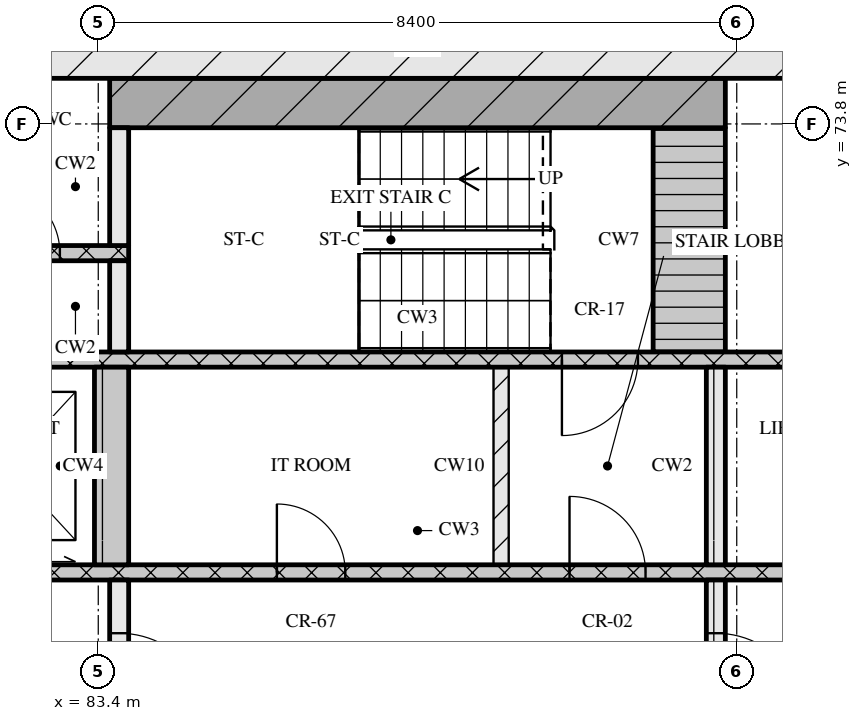
"""IFC4 building model, lengths in metres.
Left out: names, types, materials, properties, quantities, classifications, styles, units other than length and angle.
Written with IfcOpenShell. Run it as: python <this file> out.ifc"""

import sys

from ifc_helpers import new_model, si_unit, direction, frame, frame_2d, origin, place, context, subcontext, project, spatial, rectangle, extrude, element, fill, save


model = new_model("IFC4")
c1 = context("Model", 3, precision=1e-05, world=origin(), true_north=direction((0.0, 1.0)))
c2 = subcontext(c1, "Body", "Model", "MODEL_VIEW")
j1 = project(units=[si_unit("LENGTHUNIT", "METRE"), si_unit("PLANEANGLEUNIT", "RADIAN")], contexts=[c1])
p1 = place(None, origin())
s1 = spatial("IfcSite", under=j1, at=p1, CompositionType="ELEMENT")
p2 = place(p1, origin())
s2 = spatial("IfcBuilding", under=s1, at=p2, CompositionType="ELEMENT")
p3 = place(p2, frame((0.0, 0.0, 80.4)))
s3 = spatial("IfcBuildingStorey", under=s2, at=p3, CompositionType="ELEMENT", Elevation=80.4)
p4 = place(p3, frame((66.6, 75.0, 0.0), z_axis=(0.0, 0.0, 1.0), x_axis=(1.0, 0.0, 0.0)))
e1 = element("IfcWall", 1, at=p4, inside=s3, PredefinedType="SOLIDWALL", context=c2, shape_type="SweptSolid", body=[
    extrude(rectangle(XDim=42.0, YDim=1.2, at=frame_2d((21.0, 0.0))), origin(), (0.0, 0.0, 1.0), 3.3),
])
p5 = place(p3, frame((83.675, 65.2, 0.0), z_axis=(0.0, 0.0, 1.0), x_axis=(0.0, 1.0, 0.0)))
e2 = element("IfcWall", 2, at=p5, inside=s3, PredefinedType="SOLIDWALL", context=c2, shape_type="SweptSolid", body=[
    extrude(rectangle(XDim=2.6, YDim=0.25, at=frame_2d((1.3, 0.0))), origin(), (0.0, 0.0, 1.0), 3.3),
])
p6 = place(p5, frame((0.7, 0.0, 0.0)))
e3 = element("IfcOpeningElement", 3, at=p6, cuts=e2, PredefinedType="OPENING", context=c2, shape_type="SweptSolid", body=[
    extrude(rectangle(XDim=1.2, YDim=2.1, at=frame_2d((0.6, 1.05))), frame((0.0, 0.135, 0.0), z_axis=(0.0, -1.0, 0.0), x_axis=(1.0, 0.0, 0.0)), (0.0, 0.0, 1.0), 0.27),
])
p7 = place(p3, frame((91.525, 65.2, 0.0), z_axis=(0.0, 0.0, 1.0), x_axis=(0.0, 1.0, 0.0)))
e4 = element("IfcWall", 4, at=p7, inside=s3, PredefinedType="SOLIDWALL", context=c2, shape_type="SweptSolid", body=[
    extrude(rectangle(XDim=2.6, YDim=0.25, at=frame_2d((1.3, 0.0))), origin(), (0.0, 0.0, 1.0), 3.3),
])
p8 = place(p7, frame((0.7, 0.0, 0.0)))
e5 = element("IfcOpeningElement", 5, at=p8, cuts=e4, PredefinedType="OPENING", context=c2, shape_type="SweptSolid", body=[
    extrude(rectangle(XDim=1.2, YDim=2.1, at=frame_2d((0.6, 1.05))), frame((0.0, 0.135, 0.0), z_axis=(0.0, -1.0, 0.0), x_axis=(1.0, 0.0, 0.0)), (0.0, 0.0, 1.0), 0.27),
])
p9 = place(p3, frame((76.05, 67.9, 0.0), z_axis=(0.0, 0.0, 1.0), x_axis=(1.0, 0.0, 0.0)))
e6 = element("IfcWall", 6, at=p9, inside=s3, PredefinedType="SOLIDWALL", context=c2, shape_type="SweptSolid", body=[
    extrude(rectangle(XDim=23.1, YDim=0.2, at=frame_2d((11.55, 0.0))), origin(), (0.0, 0.0, 1.0), 3.3),
])
p10 = place(p9, frame((0.6, 0.0, 0.0)))
e7 = element("IfcOpeningElement", 7, at=p10, cuts=e6, PredefinedType="OPENING", context=c2, shape_type="SweptSolid", body=[
    extrude(rectangle(XDim=1.1, YDim=2.1, at=frame_2d((0.55, 1.05))), frame((0.0, 0.11, 0.0), z_axis=(0.0, -1.0, 0.0), x_axis=(1.0, 0.0, 0.0)), (0.0, 0.0, 1.0), 0.22),
])
p11 = place(p9, frame((3.1, 0.0, 0.0)))
e8 = element("IfcOpeningElement", 8, at=p11, cuts=e6, PredefinedType="OPENING", context=c2, shape_type="SweptSolid", body=[
    extrude(rectangle(XDim=1.1, YDim=2.1, at=frame_2d((0.55, 1.05))), frame((0.0, 0.11, 0.0), z_axis=(0.0, -1.0, 0.0), x_axis=(1.0, 0.0, 0.0)), (0.0, 0.0, 1.0), 0.22),
])
p12 = place(p9, frame((5.6, 0.0, 0.0)))
e9 = element("IfcOpeningElement", 9, at=p12, cuts=e6, PredefinedType="OPENING", context=c2, shape_type="SweptSolid", body=[
    extrude(rectangle(XDim=1.1, YDim=2.1, at=frame_2d((0.55, 1.05))), frame((0.0, 0.11, 0.0), z_axis=(0.0, -1.0, 0.0), x_axis=(1.0, 0.0, 0.0)), (0.0, 0.0, 1.0), 0.22),
])
p13 = place(p9, frame((9.7, 0.0, 0.0)))
e10 = element("IfcOpeningElement", 10, at=p13, cuts=e6, PredefinedType="OPENING", context=c2, shape_type="SweptSolid", body=[
    extrude(rectangle(XDim=0.9, YDim=2.1, at=frame_2d((0.45, 1.05))), frame((0.0, 0.11, 0.0), z_axis=(0.0, -1.0, 0.0), x_axis=(1.0, 0.0, 0.0)), (0.0, 0.0, 1.0), 0.22),
])
p14 = place(p9, frame((13.55, 0.0, 0.0)))
e11 = element("IfcOpeningElement", 11, at=p14, cuts=e6, PredefinedType="OPENING", context=c2, shape_type="SweptSolid", body=[
    extrude(rectangle(XDim=1.0, YDim=2.1, at=frame_2d((0.5, 1.05))), frame((0.0, 0.11, 0.0), z_axis=(0.0, -1.0, 0.0), x_axis=(1.0, 0.0, 0.0)), (0.0, 0.0, 1.0), 0.22),
])
p15 = place(p3, frame((83.575, 68.0, 0.0), z_axis=(0.0, 0.0, 1.0), x_axis=(0.0, 1.0, 0.0)))
e12 = element("IfcWall", 12, at=p15, inside=s3, PredefinedType="SOLIDWALL", context=c2, shape_type="SweptSolid", body=[
    extrude(rectangle(XDim=2.6, YDim=0.45, at=frame_2d((1.3, 0.0))), origin(), (0.0, 0.0, 1.0), 3.3),
])
p16 = place(p3, frame((88.7, 68.0, 0.0), z_axis=(0.0, 0.0, 1.0), x_axis=(0.0, 1.0, 0.0)))
e13 = element("IfcWall", 13, at=p16, inside=s3, PredefinedType="PARTITIONING", context=c2, shape_type="SweptSolid", body=[
    extrude(rectangle(XDim=2.6, YDim=0.2, at=frame_2d((1.3, 0.0))), origin(), (0.0, 0.0, 1.0), 3.3),
])
p17 = place(p3, frame((91.525, 68.0, 0.0), z_axis=(0.0, 0.0, 1.0), x_axis=(0.0, 1.0, 0.0)))
e14 = element("IfcWall", 14, at=p17, inside=s3, PredefinedType="SOLIDWALL", context=c2, shape_type="SweptSolid", body=[
    extrude(rectangle(XDim=2.6, YDim=0.25, at=frame_2d((1.3, 0.0))), origin(), (0.0, 0.0, 1.0), 3.3),
])
p18 = place(p3, frame((67.8, 70.7, 0.0), z_axis=(0.0, 0.0, 1.0), x_axis=(1.0, 0.0, 0.0)))
e15 = element("IfcWall", 15, at=p18, inside=s3, PredefinedType="SOLIDWALL", context=c2, shape_type="SweptSolid", body=[
    extrude(rectangle(XDim=39.6, YDim=0.2, at=frame_2d((19.8, 0.0))), origin(), (0.0, 0.0, 1.0), 3.3),
])
p19 = place(p18, frame((0.65, 0.0, 0.0)))
e16 = element("IfcOpeningElement", 16, at=p19, cuts=e15, PredefinedType="OPENING", context=c2, shape_type="SweptSolid", body=[
    extrude(rectangle(XDim=1.1, YDim=2.1, at=frame_2d((0.55, 1.05))), frame((0.0, 0.11, 0.0), z_axis=(0.0, -1.0, 0.0), x_axis=(1.0, 0.0, 0.0)), (0.0, 0.0, 1.0), 0.22),
])
p20 = place(p18, frame((3.25, 0.0, 0.0)))
e17 = element("IfcOpeningElement", 17, at=p20, cuts=e15, PredefinedType="OPENING", context=c2, shape_type="SweptSolid", body=[
    extrude(rectangle(XDim=1.1, YDim=2.1, at=frame_2d((0.55, 1.05))), frame((0.0, 0.11, 0.0), z_axis=(0.0, -1.0, 0.0), x_axis=(1.0, 0.0, 0.0)), (0.0, 0.0, 1.0), 0.22),
])
p21 = place(p18, frame((5.9, 0.0, 0.0)))
e18 = element("IfcOpeningElement", 18, at=p21, cuts=e15, PredefinedType="OPENING", context=c2, shape_type="SweptSolid", body=[
    extrude(rectangle(XDim=1.0, YDim=2.1, at=frame_2d((0.5, 1.05))), frame((0.0, 0.11, 0.0), z_axis=(0.0, -1.0, 0.0), x_axis=(1.0, 0.0, 0.0)), (0.0, 0.0, 1.0), 0.22),
])
p22 = place(p18, frame((21.7, 0.0, 0.0)))
e19 = element("IfcOpeningElement", 19, at=p22, cuts=e15, PredefinedType="OPENING", context=c2, shape_type="SweptSolid", body=[
    extrude(rectangle(XDim=1.0, YDim=2.1, at=frame_2d((0.5, 1.05))), frame((0.0, 0.11, 0.0), z_axis=(0.0, -1.0, 0.0), x_axis=(1.0, 0.0, 0.0)), (0.0, 0.0, 1.0), 0.22),
])
p23 = place(p18, frame((32.7, 0.0, 0.0)))
e20 = element("IfcOpeningElement", 20, at=p23, cuts=e15, PredefinedType="OPENING", context=c2, shape_type="SweptSolid", body=[
    extrude(rectangle(XDim=1.0, YDim=2.1, at=frame_2d((0.5, 1.05))), frame((0.0, 0.11, 0.0), z_axis=(0.0, -1.0, 0.0), x_axis=(1.0, 0.0, 0.0)), (0.0, 0.0, 1.0), 0.22),
])
p24 = place(p18, frame((35.25, 0.0, 0.0)))
e21 = element("IfcOpeningElement", 21, at=p24, cuts=e15, PredefinedType="OPENING", context=c2, shape_type="SweptSolid", body=[
    extrude(rectangle(XDim=1.1, YDim=2.1, at=frame_2d((0.55, 1.05))), frame((0.0, 0.11, 0.0), z_axis=(0.0, -1.0, 0.0), x_axis=(1.0, 0.0, 0.0)), (0.0, 0.0, 1.0), 0.22),
])
p25 = place(p18, frame((37.85, 0.0, 0.0)))
e22 = element("IfcOpeningElement", 22, at=p25, cuts=e15, PredefinedType="OPENING", context=c2, shape_type="SweptSolid", body=[
    extrude(rectangle(XDim=1.1, YDim=2.1, at=frame_2d((0.55, 1.05))), frame((0.0, 0.11, 0.0), z_axis=(0.0, -1.0, 0.0), x_axis=(1.0, 0.0, 0.0)), (0.0, 0.0, 1.0), 0.22),
])
p26 = place(p3, frame((83.675, 70.8, 0.0), z_axis=(0.0, 0.0, 1.0), x_axis=(0.0, 1.0, 0.0)))
e23 = element("IfcWall", 23, at=p26, inside=s3, PredefinedType="SOLIDWALL", context=c2, shape_type="SweptSolid", body=[
    extrude(rectangle(XDim=1.2, YDim=0.25, at=frame_2d((0.6, 0.0))), origin(), (0.0, 0.0, 1.0), 3.3),
])
p27 = place(p3, frame((91.175, 70.8, 0.0), z_axis=(0.0, 0.0, 1.0), x_axis=(0.0, 1.0, 0.0)))
e24 = element("IfcWall", 24, at=p27, inside=s3, PredefinedType="SOLIDWALL", context=c2, shape_type="SweptSolid", body=[
    extrude(rectangle(XDim=2.95, YDim=0.95, at=frame_2d((1.475, 0.0))), origin(), (0.0, 0.0, 1.0), 3.3),
])
p28 = place(p3, frame((72.8, 72.1, 0.0), z_axis=(0.0, 0.0, 1.0), x_axis=(1.0, 0.0, 0.0)))
e25 = element("IfcWall", 25, at=p28, inside=s3, PredefinedType="SOLIDWALL", context=c2, shape_type="SweptSolid", body=[
    extrude(rectangle(XDim=11.0, YDim=0.2, at=frame_2d((5.5, 0.0))), origin(), (0.0, 0.0, 1.0), 3.3),
])
p29 = place(p28, frame((1.25, 0.0, 0.0)))
e26 = element("IfcOpeningElement", 26, at=p29, cuts=e25, PredefinedType="OPENING", context=c2, shape_type="SweptSolid", body=[
    extrude(rectangle(XDim=0.9, YDim=2.1, at=frame_2d((0.45, 1.05))), frame((0.0, 0.11, 0.0), z_axis=(0.0, -1.0, 0.0), x_axis=(1.0, 0.0, 0.0)), (0.0, 0.0, 1.0), 0.22),
])
p30 = place(p28, frame((3.85, 0.0, 0.0)))
e27 = element("IfcOpeningElement", 27, at=p30, cuts=e25, PredefinedType="OPENING", context=c2, shape_type="SweptSolid", body=[
    extrude(rectangle(XDim=0.9, YDim=2.1, at=frame_2d((0.45, 1.05))), frame((0.0, 0.11, 0.0), z_axis=(0.0, -1.0, 0.0), x_axis=(1.0, 0.0, 0.0)), (0.0, 0.0, 1.0), 0.22),
])
p31 = place(p28, frame((6.42, 0.0, 0.0)))
e28 = element("IfcOpeningElement", 28, at=p31, cuts=e25, PredefinedType="OPENING", context=c2, shape_type="SweptSolid", body=[
    extrude(rectangle(XDim=0.9, YDim=2.1, at=frame_2d((0.45, 1.05))), frame((0.0, 0.11, 0.0), z_axis=(0.0, -1.0, 0.0), x_axis=(1.0, 0.0, 0.0)), (0.0, 0.0, 1.0), 0.22),
])
p32 = place(p28, frame((9.195, 0.0, 0.0)))
e29 = element("IfcOpeningElement", 29, at=p32, cuts=e25, PredefinedType="OPENING", context=c2, shape_type="SweptSolid", body=[
    extrude(rectangle(XDim=0.9, YDim=2.1, at=frame_2d((0.45, 1.05))), frame((0.0, 0.11, 0.0), z_axis=(0.0, -1.0, 0.0), x_axis=(1.0, 0.0, 0.0)), (0.0, 0.0, 1.0), 0.22),
])
p33 = place(p3, frame((83.675, 72.2, 0.0), z_axis=(0.0, 0.0, 1.0), x_axis=(0.0, 1.0, 0.0)))
e30 = element("IfcWall", 30, at=p33, inside=s3, PredefinedType="SOLIDWALL", context=c2, shape_type="SweptSolid", body=[
    extrude(rectangle(XDim=1.55, YDim=0.25, at=frame_2d((0.775, 0.0))), origin(), (0.0, 0.0, 1.0), 3.3),
])
p34 = place(p3, frame((83.55, 74.075, 0.0), z_axis=(0.0, 0.0, 1.0), x_axis=(1.0, 0.0, 0.0)))
e31 = element("IfcWall", 31, at=p34, inside=s3, PredefinedType="SOLIDWALL", context=c2, shape_type="SweptSolid", body=[
    extrude(rectangle(XDim=8.1, YDim=0.65, at=frame_2d((4.05, 0.0))), origin(), (0.0, 0.0, 1.0), 3.3),
])
p35 = place(p6, origin())
e32 = element("IfcDoor", 32, at=p35, inside=s3, OperationType="SINGLE_SWING_RIGHT", PredefinedType="DOOR", context=c2, shape_type="SweptSolid", body=[
    extrude(rectangle(XDim=1.2, YDim=2.1, at=frame_2d((0.6, 1.05))), frame((0.0, 0.025, 0.0), z_axis=(0.0, -1.0, 0.0), x_axis=(1.0, 0.0, 0.0)), (0.0, 0.0, 1.0), 0.05),
])
fill(e3, e32)
p36 = place(p8, origin())
e33 = element("IfcDoor", 33, at=p36, inside=s3, OperationType="SINGLE_SWING_RIGHT", PredefinedType="DOOR", context=c2, shape_type="SweptSolid", body=[
    extrude(rectangle(XDim=1.2, YDim=2.1, at=frame_2d((0.6, 1.05))), frame((0.0, 0.025, 0.0), z_axis=(0.0, -1.0, 0.0), x_axis=(1.0, 0.0, 0.0)), (0.0, 0.0, 1.0), 0.05),
])
fill(e5, e33)
p37 = place(p13, origin())
e34 = element("IfcDoor", 34, at=p37, inside=s3, OperationType="SINGLE_SWING_LEFT", PredefinedType="DOOR", context=c2, shape_type="SweptSolid", body=[
    extrude(rectangle(XDim=0.9, YDim=2.1, at=frame_2d((0.45, 1.05))), frame((0.0, 0.025, 0.0), z_axis=(0.0, -1.0, 0.0), x_axis=(1.0, 0.0, 0.0)), (0.0, 0.0, 1.0), 0.05),
])
fill(e10, e34)
p38 = place(p14, origin())
e35 = element("IfcDoor", 35, at=p38, inside=s3, OperationType="SINGLE_SWING_LEFT", PredefinedType="DOOR", context=c2, shape_type="SweptSolid", body=[
    extrude(rectangle(XDim=1.0, YDim=2.1, at=frame_2d((0.5, 1.05))), frame((0.0, 0.025, 0.0), z_axis=(0.0, -1.0, 0.0), x_axis=(1.0, 0.0, 0.0)), (0.0, 0.0, 1.0), 0.05),
])
fill(e11, e35)
p39 = place(p22, origin())
e36 = element("IfcDoor", 36, at=p39, inside=s3, OperationType="SINGLE_SWING_RIGHT", PredefinedType="DOOR", context=c2, shape_type="SweptSolid", body=[
    extrude(rectangle(XDim=1.0, YDim=2.1, at=frame_2d((0.5, 1.05))), frame((0.0, 0.025, 0.0), z_axis=(0.0, -1.0, 0.0), x_axis=(1.0, 0.0, 0.0)), (0.0, 0.0, 1.0), 0.05),
])
fill(e19, e36)
p40 = place(p32, origin())
e37 = element("IfcDoor", 37, at=p40, inside=s3, OperationType="SINGLE_SWING_LEFT", PredefinedType="DOOR", context=c2, shape_type="SweptSolid", body=[
    extrude(rectangle(XDim=0.9, YDim=2.1, at=frame_2d((0.45, 1.05))), frame((0.0, 0.025, 0.0), z_axis=(0.0, -1.0, 0.0), x_axis=(1.0, 0.0, 0.0)), (0.0, 0.0, 1.0), 0.05),
])
fill(e29, e37)
save(model, sys.argv[1])
